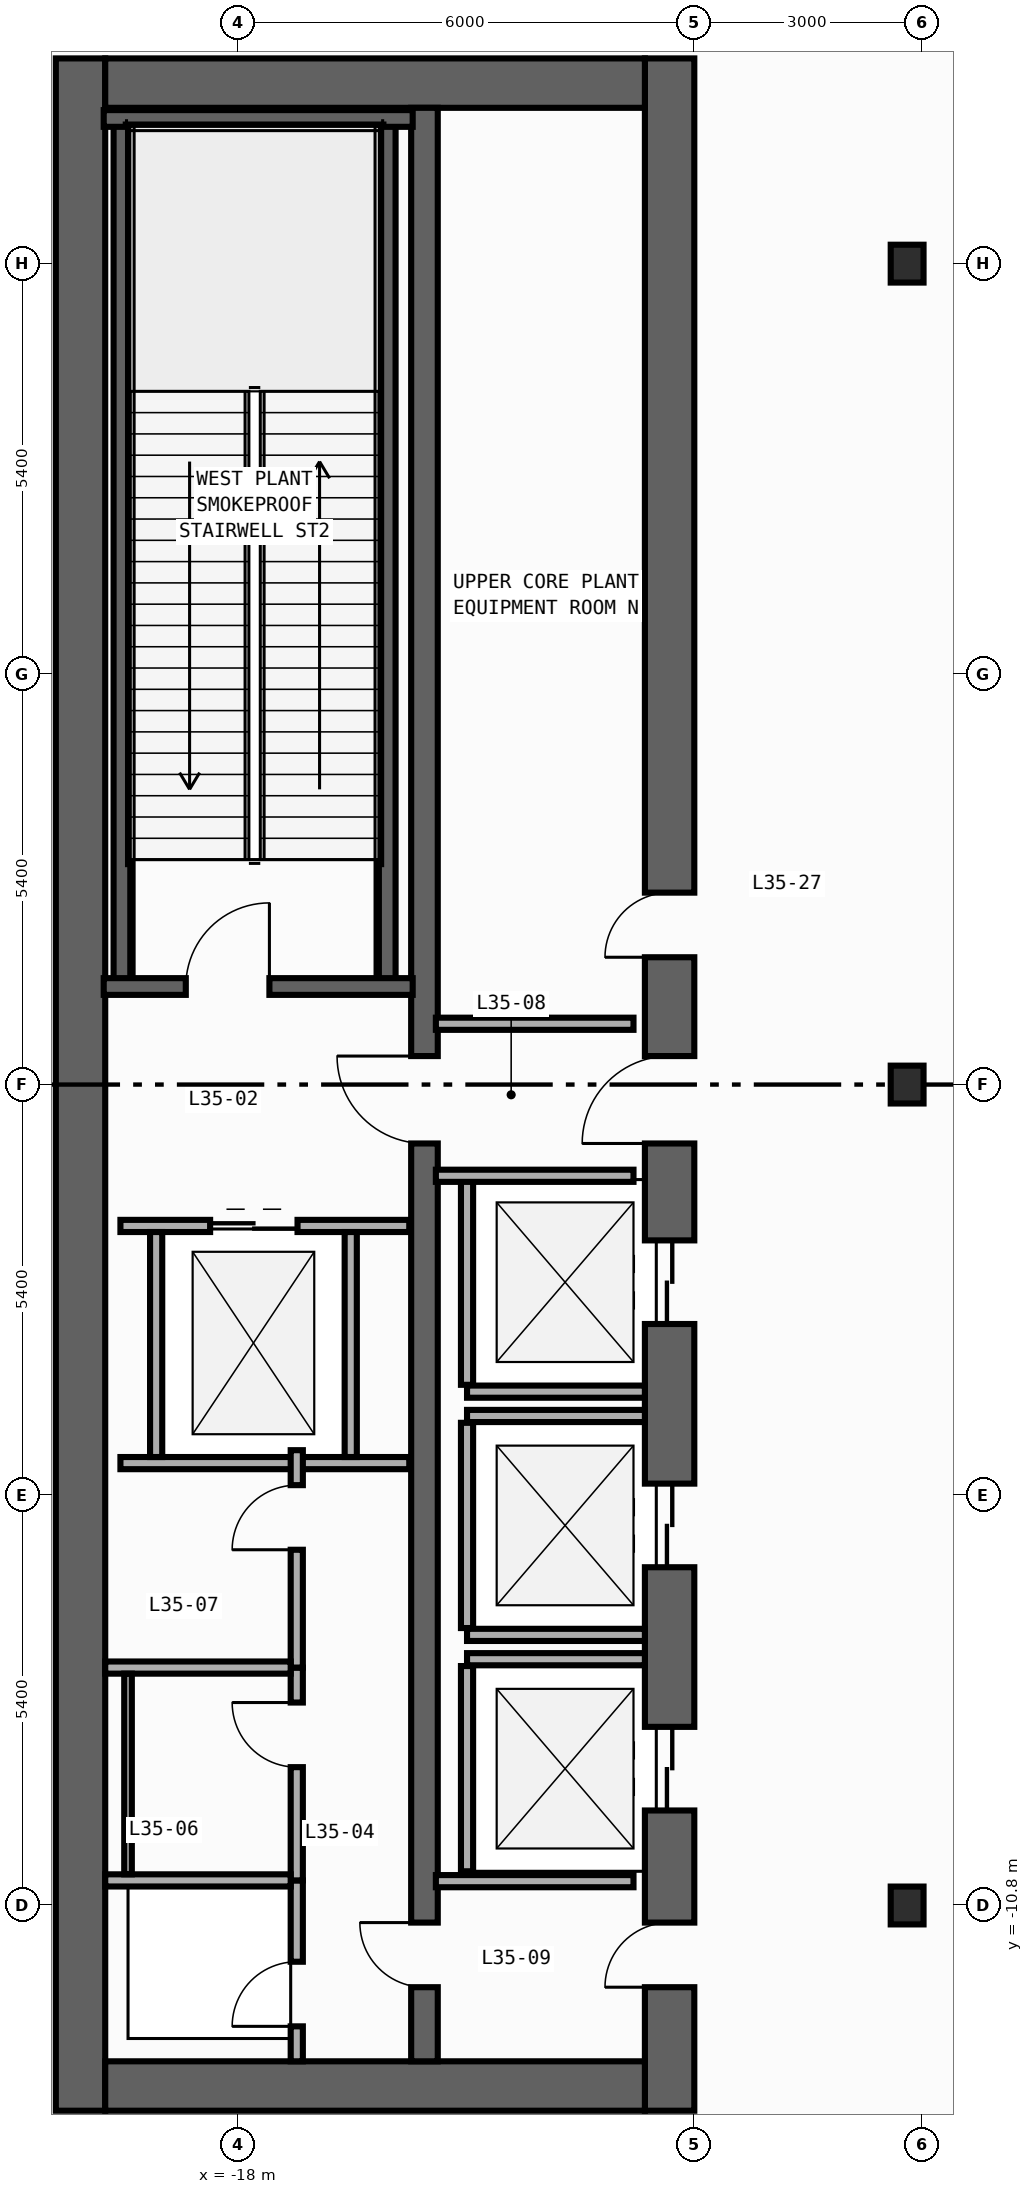
"""IFC4 building model, lengths in metres.
Left out: names, types, materials, properties, quantities, classifications, styles, units other than length and angle.
Written with IfcOpenShell. Run it as: python <this file> out.ifc"""

import sys

from ifc_helpers import new_model, si_unit, direction, frame, frame_2d, origin, origin_2d, place, context, subcontext, project, spatial, rectangle, i_section, extrude, element, fill, save


model = new_model("IFC4")
c1 = context("Model", 3, precision=1e-05, world=origin(), true_north=direction((0.0, 1.0)))
c2 = subcontext(c1, "Body", "Model", "MODEL_VIEW")
j1 = project(units=[si_unit("LENGTHUNIT", "METRE"), si_unit("PLANEANGLEUNIT", "RADIAN")], contexts=[c1])
p1 = place(None, origin())
s1 = spatial("IfcSite", under=j1, at=p1, CompositionType="ELEMENT")
p2 = place(p1, origin())
s2 = spatial("IfcBuilding", under=s1, at=p2, CompositionType="ELEMENT")
p3 = place(p2, frame((0.0, 0.0, 152.0)))
s3 = spatial("IfcBuildingStorey", under=s2, at=p3, CompositionType="ELEMENT", Elevation=152.0)
p4 = place(p3, frame((-20.075, -13.5, 0.0), z_axis=(0.0, 0.0, 1.0), x_axis=(0.0, 1.0, 0.0)))
e1 = element("IfcWall", 1, at=p4, inside=s3, PredefinedType="SHEAR", context=c2, shape_type="SweptSolid", body=[
    extrude(rectangle(XDim=27.0, YDim=0.65, at=frame_2d((13.5, 0.0))), origin(), (0.0, 0.0, 1.0), 8.14),
])
p5 = place(p3, frame((-12.325, -13.5, 0.0), z_axis=(0.0, 0.0, 1.0), x_axis=(0.0, 1.0, 0.0)))
e2 = element("IfcWall", 2, at=p5, inside=s3, PredefinedType="SHEAR", context=c2, shape_type="SweptSolid", body=[
    extrude(rectangle(XDim=27.0, YDim=0.65, at=frame_2d((13.5, 0.0))), origin(), (0.0, 0.0, 1.0), 8.14),
])
p6 = place(p5, frame((10.35, 0.0, 0.0)))
e3 = element("IfcOpeningElement", 3, at=p6, cuts=e2, PredefinedType="OPENING", context=c2, shape_type="SweptSolid", body=[
    extrude(rectangle(XDim=1.1, YDim=2.2, at=frame_2d((0.55, 1.1))), frame((0.0, 0.335, 0.0), z_axis=(0.0, -1.0, 0.0), x_axis=(1.0, 0.0, 0.0)), (0.0, 0.0, 1.0), 0.67),
])
p7 = place(p5, frame((7.15, 0.0, 0.0)))
e4 = element("IfcOpeningElement", 4, at=p7, cuts=e2, PredefinedType="OPENING", context=c2, shape_type="SweptSolid", body=[
    extrude(rectangle(XDim=1.1, YDim=2.2, at=frame_2d((0.55, 1.1))), frame((0.0, 0.335, 0.0), z_axis=(0.0, -1.0, 0.0), x_axis=(1.0, 0.0, 0.0)), (0.0, 0.0, 1.0), 0.67),
])
p8 = place(p5, frame((3.95, 0.0, 0.0)))
e5 = element("IfcOpeningElement", 5, at=p8, cuts=e2, PredefinedType="OPENING", context=c2, shape_type="SweptSolid", body=[
    extrude(rectangle(XDim=1.1, YDim=2.2, at=frame_2d((0.55, 1.1))), frame((0.0, 0.335, 0.0), z_axis=(0.0, -1.0, 0.0), x_axis=(1.0, 0.0, 0.0)), (0.0, 0.0, 1.0), 0.67),
])
p9 = place(p5, frame((15.175, 0.0, 0.0)))
e6 = element("IfcOpeningElement", 6, at=p9, cuts=e2, PredefinedType="OPENING", context=c2, shape_type="SweptSolid", body=[
    extrude(rectangle(XDim=0.85, YDim=2.1, at=frame_2d((0.425, 1.05))), frame((0.0, 0.335, 0.0), z_axis=(0.0, -1.0, 0.0), x_axis=(1.0, 0.0, 0.0)), (0.0, 0.0, 1.0), 0.67),
])
p10 = place(p5, frame((12.725, 0.0, 0.0)))
e7 = element("IfcOpeningElement", 7, at=p10, cuts=e2, PredefinedType="OPENING", context=c2, shape_type="SweptSolid", body=[
    extrude(rectangle(XDim=1.15, YDim=2.2, at=frame_2d((0.575, 1.1))), frame((0.0, 0.335, 0.0), z_axis=(0.0, -1.0, 0.0), x_axis=(1.0, 0.0, 0.0)), (0.0, 0.0, 1.0), 0.67),
])
p11 = place(p5, frame((1.625, 0.0, 0.0)))
e8 = element("IfcOpeningElement", 8, at=p11, cuts=e2, PredefinedType="OPENING", context=c2, shape_type="SweptSolid", body=[
    extrude(rectangle(XDim=0.85, YDim=2.1, at=frame_2d((0.425, 1.05))), frame((0.0, 0.335, 0.0), z_axis=(0.0, -1.0, 0.0), x_axis=(1.0, 0.0, 0.0)), (0.0, 0.0, 1.0), 0.67),
])
for number, where, z_axis, x_axis in (
    (9, (-19.75, -13.175, 0.0), (0.0, 0.0, 1.0), (1.0, 0.0, 0.0)),
    (10, (-19.75, 13.175, 0.0), (0.0, 0.0, 1.0), (1.0, 0.0, 0.0)),
):
    element("IfcWall", number, at=place(p3, frame(where, z_axis=z_axis, x_axis=x_axis)), inside=s3, PredefinedType="SHEAR", context=c2, shape_type="SweptSolid", body=[
        extrude(rectangle(XDim=7.1, YDim=0.65, at=frame_2d((3.55, 0.0))), origin(), (0.0, 0.0, 1.0), 8.14),
    ])
p12 = place(p3, frame((-15.55, -12.85, 0.0), z_axis=(0.0, 0.0, 1.0), x_axis=(0.0, 1.0, 0.0)))
e11 = element("IfcWall", 11, at=p12, inside=s3, PredefinedType="SHEAR", context=c2, shape_type="SweptSolid", body=[
    extrude(rectangle(XDim=25.7, YDim=0.35, at=frame_2d((12.85, 0.0))), origin(), (0.0, 0.0, 1.0), 8.14),
])
p13 = place(p12, frame((12.075, 0.0, 0.0)))
e12 = element("IfcOpeningElement", 12, at=p13, cuts=e11, PredefinedType="OPENING", context=c2, shape_type="SweptSolid", body=[
    extrude(rectangle(XDim=1.15, YDim=2.2, at=frame_2d((0.575, 1.1))), frame((0.0, 0.185, 0.0), z_axis=(0.0, -1.0, 0.0), x_axis=(1.0, 0.0, 0.0)), (0.0, 0.0, 1.0), 0.37),
])
p14 = place(p12, frame((0.975, 0.0, 0.0)))
e13 = element("IfcOpeningElement", 13, at=p14, cuts=e11, PredefinedType="OPENING", context=c2, shape_type="SweptSolid", body=[
    extrude(rectangle(XDim=0.85, YDim=2.1, at=frame_2d((0.425, 1.05))), frame((0.0, 0.185, 0.0), z_axis=(0.0, -1.0, 0.0), x_axis=(1.0, 0.0, 0.0)), (0.0, 0.0, 1.0), 0.37),
])
for number, where, z_axis, x_axis in (
    (14, (-16.04, 1.29, 0.0), (0.0, 0.0, 1.0), (0.0, 1.0, 0.0)),
    (15, (-19.53, 1.29, 0.0), (0.0, 0.0, 1.0), (0.0, 1.0, 0.0)),
):
    element("IfcWall", number, at=place(p3, frame(where, z_axis=z_axis, x_axis=x_axis)), inside=s3, PredefinedType="SHEAR", context=c2, shape_type="SweptSolid", body=[
        extrude(rectangle(XDim=11.42, YDim=0.22, at=frame_2d((5.71, 0.0))), origin(), (0.0, 0.0, 1.0), 8.14),
    ])
p15 = place(p3, frame((-19.77, 12.71, 0.0), z_axis=(0.0, 0.0, 1.0), x_axis=(1.0, 0.0, 0.0)))
e16 = element("IfcWall", 16, at=p15, inside=s3, PredefinedType="SHEAR", context=c2, shape_type="SweptSolid", body=[
    extrude(rectangle(XDim=4.065, YDim=0.22, at=frame_2d((2.032, 0.0))), origin(), (0.0, 0.0, 1.0), 8.14),
])
p16 = place(p3, frame((-19.77, 1.29, 0.0), z_axis=(0.0, 0.0, 1.0), x_axis=(1.0, 0.0, 0.0)))
e17 = element("IfcWall", 17, at=p16, inside=s3, PredefinedType="SHEAR", context=c2, shape_type="SweptSolid", body=[
    extrude(rectangle(XDim=4.065, YDim=0.22, at=frame_2d((2.032, 0.0))), origin(), (0.0, 0.0, 1.0), 8.14),
])
p17 = place(p16, frame((1.08, 0.0, 0.0)))
e18 = element("IfcOpeningElement", 18, at=p17, cuts=e17, PredefinedType="OPENING", context=c2, shape_type="SweptSolid", body=[
    extrude(rectangle(XDim=1.1, YDim=2.2, at=frame_2d((0.55, 1.1))), frame((0.0, 0.12, 0.0), z_axis=(0.0, -1.0, 0.0), x_axis=(1.0, 0.0, 0.0)), (0.0, 0.0, 1.0), 0.24),
])
for number, where, z_axis, x_axis in (
    (19, (-9.2, -10.8, 0.0), (0.0, 0.0, 1.0), (1.0, 0.0, 0.0)),
    (20, (-9.2, 0.0, 0.0), (0.0, 0.0, 1.0), (1.0, 0.0, 0.0)),
    (21, (-9.2, 10.8, 0.0), (0.0, 0.0, 1.0), (1.0, 0.0, 0.0)),
):
    element("IfcColumn", number, at=place(p3, frame(where, z_axis=z_axis, x_axis=x_axis)), inside=s3, PredefinedType="COLUMN", context=c2, shape_type="SweptSolid", body=[
        extrude(i_section(OverallWidth=0.432, OverallDepth=0.498, WebThickness=0.045, FlangeThickness=0.07, FilletRadius=0.022, at=origin_2d()), origin(), (0.0, 0.0, 1.0), 8.4),
    ])
p18 = place(p3, frame((-14.99, -4.04, 0.0), z_axis=(0.0, 0.0, 1.0), x_axis=(1.0, 0.0, 0.0)))
e22 = element("IfcWall", 22, at=p18, inside=s3, PredefinedType="STANDARD", context=c2, shape_type="SweptSolid", body=[
    extrude(rectangle(XDim=2.34, YDim=0.16, at=frame_2d((1.17, 0.0))), origin(), (0.0, 0.0, 1.0), 8.14),
])
p19 = place(p3, frame((-14.99, -3.95, 0.0), z_axis=(0.0, 0.0, 1.0), x_axis=(0.0, 1.0, 0.0)))
e23 = element("IfcWall", 23, at=p19, inside=s3, PredefinedType="STANDARD", context=c2, shape_type="SweptSolid", body=[
    extrude(rectangle(XDim=2.7, YDim=0.16, at=frame_2d((1.35, 0.0))), origin(), (0.0, 0.0, 1.0), 8.14),
])
for number, where, z_axis, x_axis in (
    (24, (-14.99, -7.24, 0.0), (0.0, 0.0, 1.0), (1.0, 0.0, 0.0)),
    (25, (-14.99, -4.36, 0.0), (0.0, 0.0, 1.0), (1.0, 0.0, 0.0)),
):
    element("IfcWall", number, at=place(p3, frame(where, z_axis=z_axis, x_axis=x_axis)), inside=s3, PredefinedType="STANDARD", context=c2, shape_type="SweptSolid", body=[
        extrude(rectangle(XDim=2.34, YDim=0.16, at=frame_2d((1.17, 0.0))), origin(), (0.0, 0.0, 1.0), 8.14),
    ])
p20 = place(p3, frame((-14.99, -7.15, 0.0), z_axis=(0.0, 0.0, 1.0), x_axis=(0.0, 1.0, 0.0)))
e26 = element("IfcWall", 26, at=p20, inside=s3, PredefinedType="STANDARD", context=c2, shape_type="SweptSolid", body=[
    extrude(rectangle(XDim=2.7, YDim=0.16, at=frame_2d((1.35, 0.0))), origin(), (0.0, 0.0, 1.0), 8.14),
])
p21 = place(p3, frame((-14.99, -7.56, 0.0), z_axis=(0.0, 0.0, 1.0), x_axis=(1.0, 0.0, 0.0)))
e27 = element("IfcWall", 27, at=p21, inside=s3, PredefinedType="STANDARD", context=c2, shape_type="SweptSolid", body=[
    extrude(rectangle(XDim=2.34, YDim=0.16, at=frame_2d((1.17, 0.0))), origin(), (0.0, 0.0, 1.0), 8.14),
])
p22 = place(p3, frame((-14.99, -10.35, 0.0), z_axis=(0.0, 0.0, 1.0), x_axis=(0.0, 1.0, 0.0)))
e28 = element("IfcWall", 28, at=p22, inside=s3, PredefinedType="STANDARD", context=c2, shape_type="SweptSolid", body=[
    extrude(rectangle(XDim=2.7, YDim=0.16, at=frame_2d((1.35, 0.0))), origin(), (0.0, 0.0, 1.0), 8.14),
])
p23 = place(p3, frame((-19.55, -1.86, 0.0), z_axis=(0.0, 0.0, 1.0), x_axis=(1.0, 0.0, 0.0)))
e29 = element("IfcWall", 29, at=p23, inside=s3, PredefinedType="STANDARD", context=c2, shape_type="SweptSolid", body=[
    extrude(rectangle(XDim=3.8, YDim=0.16, at=frame_2d((1.9, 0.0))), origin(), (0.0, 0.0, 1.0), 8.14),
])
p24 = place(p23, frame((1.18, 0.0, 0.0)))
e30 = element("IfcOpeningElement", 30, at=p24, cuts=e29, PredefinedType="OPENING", context=c2, shape_type="SweptSolid", body=[
    extrude(rectangle(XDim=1.15, YDim=2.2, at=frame_2d((0.575, 1.1))), frame((0.0, 0.09, 0.0), z_axis=(0.0, -1.0, 0.0), x_axis=(1.0, 0.0, 0.0)), (0.0, 0.0, 1.0), 0.18),
])
p25 = place(p3, frame((-19.55, -4.98, 0.0), z_axis=(0.0, 0.0, 1.0), x_axis=(1.0, 0.0, 0.0)))
e31 = element("IfcWall", 31, at=p25, inside=s3, PredefinedType="STANDARD", context=c2, shape_type="SweptSolid", body=[
    extrude(rectangle(XDim=3.8, YDim=0.16, at=frame_2d((1.9, 0.0))), origin(), (0.0, 0.0, 1.0), 8.14),
])
for number, where, z_axis, x_axis in (
    (32, (-19.08, -4.9, 0.0), (0.0, 0.0, 1.0), (0.0, 1.0, 0.0)),
    (33, (-16.52, -4.9, 0.0), (0.0, 0.0, 1.0), (0.0, 1.0, 0.0)),
):
    element("IfcWall", number, at=place(p3, frame(where, z_axis=z_axis, x_axis=x_axis)), inside=s3, PredefinedType="STANDARD", context=c2, shape_type="SweptSolid", body=[
        extrude(rectangle(XDim=2.96, YDim=0.16, at=frame_2d((1.48, 0.0))), origin(), (0.0, 0.0, 1.0), 8.14),
    ])
for number, where, z_axis, x_axis in (
    (34, (-15.4, 0.8, 0.0), (0.0, 0.0, 1.0), (1.0, 0.0, 0.0)),
    (35, (-15.4, -1.2, 0.0), (0.0, 0.0, 1.0), (1.0, 0.0, 0.0)),
    (36, (-15.4, -10.48, 0.0), (0.0, 0.0, 1.0), (1.0, 0.0, 0.0)),
):
    element("IfcWall", number, at=place(p3, frame(where, z_axis=z_axis, x_axis=x_axis)), inside=s3, PredefinedType="STANDARD", context=c2, shape_type="SweptSolid", body=[
        extrude(rectangle(XDim=2.6, YDim=0.16, at=frame_2d((1.3, 0.0))), origin(), (0.0, 0.0, 1.0), 8.14),
    ])
p26 = place(p3, frame((-17.23, -12.85, 0.0), z_axis=(0.0, 0.0, 1.0), x_axis=(0.0, 1.0, 0.0)))
e37 = element("IfcWall", 37, at=p26, inside=s3, PredefinedType="PARTITIONING", context=c2, shape_type="SweptSolid", body=[
    extrude(rectangle(XDim=2.38, YDim=0.16, at=frame_2d((1.19, 0.0))), origin(), (0.0, 0.0, 1.0), 8.14),
])
p27 = place(p26, frame((0.46, 0.0, 0.0)))
e38 = element("IfcOpeningElement", 38, at=p27, cuts=e37, PredefinedType="OPENING", context=c2, shape_type="SweptSolid", body=[
    extrude(rectangle(XDim=0.85, YDim=2.1, at=frame_2d((0.425, 1.05))), frame((0.0, 0.09, 0.0), z_axis=(0.0, -1.0, 0.0), x_axis=(1.0, 0.0, 0.0)), (0.0, 0.0, 1.0), 0.18),
])
p28 = place(p3, frame((-17.23, -10.47, 0.0), z_axis=(0.0, 0.0, 1.0), x_axis=(0.0, 1.0, 0.0)))
e39 = element("IfcWall", 39, at=p28, inside=s3, PredefinedType="PARTITIONING", context=c2, shape_type="SweptSolid", body=[
    extrude(rectangle(XDim=2.8, YDim=0.16, at=frame_2d((1.4, 0.0))), origin(), (0.0, 0.0, 1.0), 8.14),
])
p29 = place(p28, frame((1.49, 0.0, 0.0)))
e40 = element("IfcOpeningElement", 40, at=p29, cuts=e39, PredefinedType="OPENING", context=c2, shape_type="SweptSolid", body=[
    extrude(rectangle(XDim=0.85, YDim=2.1, at=frame_2d((0.425, 1.05))), frame((0.0, 0.09, 0.0), z_axis=(0.0, -1.0, 0.0), x_axis=(1.0, 0.0, 0.0)), (0.0, 0.0, 1.0), 0.18),
])
p30 = place(p3, frame((-17.23, -7.67, 0.0), z_axis=(0.0, 0.0, 1.0), x_axis=(0.0, 1.0, 0.0)))
e41 = element("IfcWall", 41, at=p30, inside=s3, PredefinedType="PARTITIONING", context=c2, shape_type="SweptSolid", body=[
    extrude(rectangle(XDim=2.86, YDim=0.16, at=frame_2d((1.43, 0.0))), origin(), (0.0, 0.0, 1.0), 8.14),
])
p31 = place(p30, frame((1.55, 0.0, 0.0)))
e42 = element("IfcOpeningElement", 42, at=p31, cuts=e41, PredefinedType="OPENING", context=c2, shape_type="SweptSolid", body=[
    extrude(rectangle(XDim=0.85, YDim=2.1, at=frame_2d((0.425, 1.05))), frame((0.0, 0.09, 0.0), z_axis=(0.0, -1.0, 0.0), x_axis=(1.0, 0.0, 0.0)), (0.0, 0.0, 1.0), 0.18),
])
for number, where, z_axis, x_axis in (
    (43, (-19.75, -10.47, 0.0), (0.0, 0.0, 1.0), (1.0, 0.0, 0.0)),
    (44, (-19.75, -7.67, 0.0), (0.0, 0.0, 1.0), (1.0, 0.0, 0.0)),
):
    element("IfcWall", number, at=place(p3, frame(where, z_axis=z_axis, x_axis=x_axis)), inside=s3, PredefinedType="PARTITIONING", context=c2, shape_type="SweptSolid", body=[
        extrude(rectangle(XDim=2.44, YDim=0.16, at=frame_2d((1.22, 0.0))), origin(), (0.0, 0.0, 1.0), 8.14),
    ])
p32 = place(p3, frame((-19.45, -10.39, 0.0), z_axis=(0.0, 0.0, 1.0), x_axis=(0.0, 1.0, 0.0)))
e45 = element("IfcWall", 45, at=p32, inside=s3, PredefinedType="PARTITIONING", context=c2, shape_type="SweptSolid", body=[
    extrude(rectangle(XDim=2.64, YDim=0.1, at=frame_2d((1.32, 0.0))), origin(), (0.0, 0.0, 1.0), 8.14),
])
p33 = place(p17, origin())
e46 = element("IfcDoor", 46, at=p33, inside=s3, OperationType="SINGLE_SWING_RIGHT", PredefinedType="DOOR", context=c2, shape_type="SweptSolid", body=[
    extrude(rectangle(XDim=1.1, YDim=2.2, at=frame_2d((0.55, 1.1))), frame((0.0, 0.025, 0.0), z_axis=(0.0, -1.0, 0.0), x_axis=(1.0, 0.0, 0.0)), (0.0, 0.0, 1.0), 0.05),
])
fill(e18, e46)
p34 = place(p6, origin())
e47 = element("IfcDoor", 47, at=p34, inside=s3, OperationType="DOUBLE_DOOR_SLIDING", PredefinedType="DOOR", context=c2, shape_type="SweptSolid", body=[
    extrude(rectangle(XDim=1.1, YDim=2.2, at=frame_2d((0.55, 1.1))), frame((0.0, 0.025, 0.0), z_axis=(0.0, -1.0, 0.0), x_axis=(1.0, 0.0, 0.0)), (0.0, 0.0, 1.0), 0.05),
])
fill(e3, e47)
p35 = place(p7, origin())
e48 = element("IfcDoor", 48, at=p35, inside=s3, OperationType="DOUBLE_DOOR_SLIDING", PredefinedType="DOOR", context=c2, shape_type="SweptSolid", body=[
    extrude(rectangle(XDim=1.1, YDim=2.2, at=frame_2d((0.55, 1.1))), frame((0.0, 0.025, 0.0), z_axis=(0.0, -1.0, 0.0), x_axis=(1.0, 0.0, 0.0)), (0.0, 0.0, 1.0), 0.05),
])
fill(e4, e48)
p36 = place(p8, origin())
e49 = element("IfcDoor", 49, at=p36, inside=s3, OperationType="DOUBLE_DOOR_SLIDING", PredefinedType="DOOR", context=c2, shape_type="SweptSolid", body=[
    extrude(rectangle(XDim=1.1, YDim=2.2, at=frame_2d((0.55, 1.1))), frame((0.0, 0.025, 0.0), z_axis=(0.0, -1.0, 0.0), x_axis=(1.0, 0.0, 0.0)), (0.0, 0.0, 1.0), 0.05),
])
fill(e5, e49)
p37 = place(p9, origin())
e50 = element("IfcDoor", 50, at=p37, inside=s3, OperationType="SINGLE_SWING_LEFT", PredefinedType="DOOR", context=c2, shape_type="SweptSolid", body=[
    extrude(rectangle(XDim=0.85, YDim=2.1, at=frame_2d((0.425, 1.05))), frame((0.0, 0.025, 0.0), z_axis=(0.0, -1.0, 0.0), x_axis=(1.0, 0.0, 0.0)), (0.0, 0.0, 1.0), 0.05),
])
fill(e6, e50)
p38 = place(p10, origin())
e51 = element("IfcDoor", 51, at=p38, inside=s3, OperationType="SINGLE_SWING_LEFT", PredefinedType="DOOR", context=c2, shape_type="SweptSolid", body=[
    extrude(rectangle(XDim=1.15, YDim=2.2, at=frame_2d((0.575, 1.1))), frame((0.0, 0.025, 0.0), z_axis=(0.0, -1.0, 0.0), x_axis=(1.0, 0.0, 0.0)), (0.0, 0.0, 1.0), 0.05),
])
fill(e7, e51)
p39 = place(p13, origin())
e52 = element("IfcDoor", 52, at=p39, inside=s3, OperationType="SINGLE_SWING_RIGHT", PredefinedType="DOOR", context=c2, shape_type="SweptSolid", body=[
    extrude(rectangle(XDim=1.15, YDim=2.2, at=frame_2d((0.575, 1.1))), frame((0.0, 0.025, 0.0), z_axis=(0.0, -1.0, 0.0), x_axis=(1.0, 0.0, 0.0)), (0.0, 0.0, 1.0), 0.05),
])
fill(e12, e52)
p40 = place(p11, origin())
e53 = element("IfcDoor", 53, at=p40, inside=s3, OperationType="SINGLE_SWING_LEFT", PredefinedType="DOOR", context=c2, shape_type="SweptSolid", body=[
    extrude(rectangle(XDim=0.85, YDim=2.1, at=frame_2d((0.425, 1.05))), frame((0.0, 0.025, 0.0), z_axis=(0.0, -1.0, 0.0), x_axis=(1.0, 0.0, 0.0)), (0.0, 0.0, 1.0), 0.05),
])
fill(e8, e53)
p41 = place(p14, origin())
e54 = element("IfcDoor", 54, at=p41, inside=s3, OperationType="SINGLE_SWING_RIGHT", PredefinedType="DOOR", context=c2, shape_type="SweptSolid", body=[
    extrude(rectangle(XDim=0.85, YDim=2.1, at=frame_2d((0.425, 1.05))), frame((0.0, 0.025, 0.0), z_axis=(0.0, -1.0, 0.0), x_axis=(1.0, 0.0, 0.0)), (0.0, 0.0, 1.0), 0.05),
])
fill(e13, e54)
p42 = place(p24, origin())
e55 = element("IfcDoor", 55, at=p42, inside=s3, OperationType="DOUBLE_DOOR_SLIDING", PredefinedType="DOOR", context=c2, shape_type="SweptSolid", body=[
    extrude(rectangle(XDim=1.15, YDim=2.2, at=frame_2d((0.575, 1.1))), frame((0.0, 0.025, 0.0), z_axis=(0.0, -1.0, 0.0), x_axis=(1.0, 0.0, 0.0)), (0.0, 0.0, 1.0), 0.05),
])
fill(e30, e55)
p43 = place(p27, origin())
e56 = element("IfcDoor", 56, at=p43, inside=s3, OperationType="SINGLE_SWING_LEFT", PredefinedType="DOOR", context=c2, shape_type="SweptSolid", body=[
    extrude(rectangle(XDim=0.85, YDim=2.1, at=frame_2d((0.425, 1.05))), frame((0.0, 0.025, 0.0), z_axis=(0.0, -1.0, 0.0), x_axis=(1.0, 0.0, 0.0)), (0.0, 0.0, 1.0), 0.05),
])
fill(e38, e56)
p44 = place(p29, origin())
e57 = element("IfcDoor", 57, at=p44, inside=s3, OperationType="SINGLE_SWING_RIGHT", PredefinedType="DOOR", context=c2, shape_type="SweptSolid", body=[
    extrude(rectangle(XDim=0.85, YDim=2.1, at=frame_2d((0.425, 1.05))), frame((0.0, 0.025, 0.0), z_axis=(0.0, -1.0, 0.0), x_axis=(1.0, 0.0, 0.0)), (0.0, 0.0, 1.0), 0.05),
])
fill(e40, e57)
p45 = place(p31, origin())
e58 = element("IfcDoor", 58, at=p45, inside=s3, OperationType="SINGLE_SWING_LEFT", PredefinedType="DOOR", context=c2, shape_type="SweptSolid", body=[
    extrude(rectangle(XDim=0.85, YDim=2.1, at=frame_2d((0.425, 1.05))), frame((0.0, 0.025, 0.0), z_axis=(0.0, -1.0, 0.0), x_axis=(1.0, 0.0, 0.0)), (0.0, 0.0, 1.0), 0.05),
])
fill(e42, e58)
save(model, sys.argv[1])
